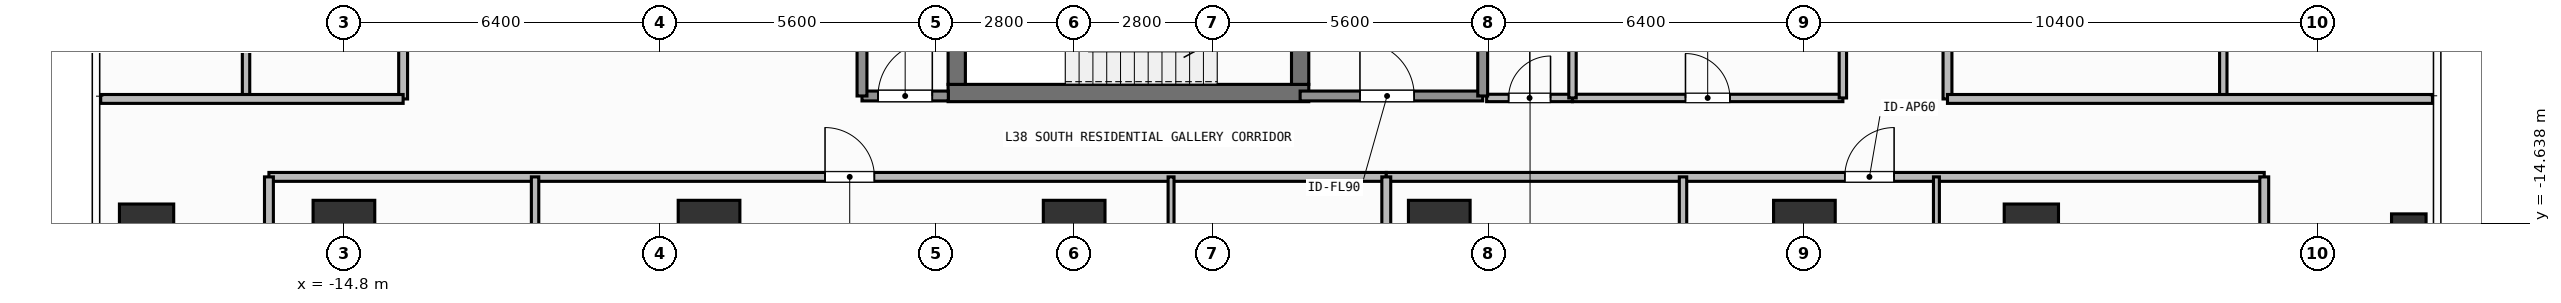
"""IFC4 building model, lengths in metres.
Left out: names, types, materials, properties, quantities, classifications, styles, units other than length and angle.
Written with IfcOpenShell. Run it as: python <this file> out.ifc"""

import sys

from ifc_helpers import new_model, si_unit, direction, frame, frame_2d, origin, origin_2d, place, context, subcontext, project, spatial, rectangle, hollow_rectangle, extrude, element, fill, save


model = new_model("IFC4")
c1 = context("Model", 3, precision=1e-05, world=origin(), true_north=direction((0.0, 1.0)))
c2 = subcontext(c1, "Body", "Model", "MODEL_VIEW")
j1 = project(units=[si_unit("LENGTHUNIT", "METRE"), si_unit("PLANEANGLEUNIT", "RADIAN")], contexts=[c1])
p1 = place(None, origin())
s1 = spatial("IfcSite", under=j1, at=p1, CompositionType="ELEMENT")
p2 = place(p1, origin())
s2 = spatial("IfcBuilding", under=s1, at=p2, CompositionType="ELEMENT")
p3 = place(p2, frame((0.0, 0.0, 152.4)))
s3 = spatial("IfcBuildingStorey", under=s2, at=p3, CompositionType="ELEMENT", Elevation=152.4)
p4 = place(p3, frame((-2.555, -12.0, 0.0), z_axis=(0.0, 0.0, 1.0), x_axis=(1.0, 0.0, 0.0)))
e1 = element("IfcWall", 1, at=p4, inside=s3, PredefinedType="SHEAR", context=c2, shape_type="SweptSolid", body=[
    extrude(rectangle(XDim=7.31, YDim=0.35, at=frame_2d((3.655, 0.0))), origin(), (0.0, 0.0, 1.0), 3.9),
])
p5 = place(p3, frame((-2.38, -11.825, 0.0), z_axis=(0.0, 0.0, 1.0), x_axis=(0.0, 1.0, 0.0)))
e2 = element("IfcWall", 2, at=p5, inside=s3, PredefinedType="SHEAR", context=c2, shape_type="SweptSolid", body=[
    extrude(rectangle(XDim=2.925, YDim=0.35, at=frame_2d((1.462, 0.0))), origin(), (0.0, 0.0, 1.0), 3.9),
])
p6 = place(p3, frame((4.58, -8.9, 0.0), z_axis=(0.0, 0.0, 1.0), x_axis=(0.0, -1.0, 0.0)))
e3 = element("IfcWall", 3, at=p6, inside=s3, PredefinedType="SHEAR", context=c2, shape_type="SweptSolid", body=[
    extrude(rectangle(XDim=2.925, YDim=0.35, at=frame_2d((1.462, 0.0))), origin(), (0.0, 0.0, 1.0), 3.9),
])
p7 = place(p6, frame((0.913, 0.0, 0.0)))
e4 = element("IfcOpeningElement", 4, at=p7, cuts=e3, PredefinedType="OPENING", context=c2, shape_type="SweptSolid", body=[
    extrude(rectangle(XDim=1.1, YDim=2.15, at=frame_2d((0.55, 1.075))), frame((0.0, 0.185, 0.0), z_axis=(0.0, -1.0, 0.0), x_axis=(1.0, 0.0, 0.0)), (0.0, 0.0, 1.0), 0.37),
])
for number, where, z_axis, x_axis in (
    (5, (-14.8, -14.8, 0.0), (0.0, 0.0, 1.0), (1.0, 0.0, 0.0)),
    (6, (-7.4, -14.8, 0.0), (0.0, 0.0, 1.0), (1.0, 0.0, 0.0)),
    (7, (0.0, -14.8, 0.0), (0.0, 0.0, 1.0), (1.0, 0.0, 0.0)),
    (8, (7.4, -14.8, 0.0), (0.0, 0.0, 1.0), (1.0, 0.0, 0.0)),
    (9, (14.8, -14.8, 0.0), (0.0, 0.0, 1.0), (1.0, 0.0, 0.0)),
):
    element("IfcColumn", number, at=place(p3, frame(where, z_axis=z_axis, x_axis=x_axis)), inside=s3, PredefinedType="COLUMN", context=c2, shape_type="SweptSolid", body=[
        extrude(rectangle(XDim=1.25, YDim=1.25, at=origin_2d()), origin(), (0.0, 0.0, 1.0), 3.9),
    ])
for number, where, z_axis, x_axis in (
    (10, (-18.8, -14.8, 0.0), (0.0, 0.0, 1.0), (1.0, 0.0, 0.0)),
    (11, (19.4, -14.8, 0.0), (0.0, 0.0, 1.0), (1.0, 0.0, 0.0)),
):
    element("IfcColumn", number, at=place(p3, frame(where, z_axis=z_axis, x_axis=x_axis)), inside=s3, PredefinedType="COLUMN", context=c2, shape_type="SweptSolid", body=[
        extrude(rectangle(XDim=1.1, YDim=1.1, at=origin_2d()), origin(), (0.0, 0.0, 1.0), 3.9),
    ])
p8 = place(p3, frame((27.05, -14.8, 0.0), z_axis=(0.0, 0.0, 1.0), x_axis=(1.0, 0.0, 0.0)))
e12 = element("IfcColumn", 12, at=p8, inside=s3, PredefinedType="COLUMN", context=c2, shape_type="SweptSolid", body=[
    extrude(hollow_rectangle(XDim=0.7, YDim=0.7, WallThickness=0.032, at=origin_2d()), origin(), (0.0, 0.0, 1.0), 3.9),
])
p9 = place(p3, frame((4.58, -12.06, 0.0), z_axis=(0.0, 0.0, 1.0), x_axis=(1.0, 0.0, 0.0)))
e13 = element("IfcWall", 13, at=p9, inside=s3, PredefinedType="SOLIDWALL", context=c2, shape_type="SweptSolid", body=[
    extrude(rectangle(XDim=3.7, YDim=0.2, at=frame_2d((1.85, 0.0))), origin(), (0.0, 0.0, 1.0), 3.6),
])
p10 = place(p9, frame((1.212, 0.0, 0.0)))
e14 = element("IfcOpeningElement", 14, at=p10, cuts=e13, PredefinedType="OPENING", context=c2, shape_type="SweptSolid", body=[
    extrude(rectangle(XDim=1.1, YDim=2.15, at=frame_2d((0.55, 1.075))), frame((0.0, 0.11, 0.0), z_axis=(0.0, -1.0, 0.0), x_axis=(1.0, 0.0, 0.0)), (0.0, 0.0, 1.0), 0.22),
])
p11 = place(p3, frame((-4.3, -12.06, 0.0), z_axis=(0.0, 0.0, 1.0), x_axis=(1.0, 0.0, 0.0)))
e15 = element("IfcWall", 15, at=p11, inside=s3, PredefinedType="SOLIDWALL", context=c2, shape_type="SweptSolid", body=[
    extrude(rectangle(XDim=1.75, YDim=0.2, at=frame_2d((0.875, 0.0))), origin(), (0.0, 0.0, 1.0), 3.6),
])
p12 = place(p11, frame((0.325, 0.0, 0.0)))
e16 = element("IfcOpeningElement", 16, at=p12, cuts=e15, PredefinedType="OPENING", context=c2, shape_type="SweptSolid", body=[
    extrude(rectangle(XDim=1.1, YDim=2.15, at=frame_2d((0.55, 1.075))), frame((0.0, 0.11, 0.0), z_axis=(0.0, -1.0, 0.0), x_axis=(1.0, 0.0, 0.0)), (0.0, 0.0, 1.0), 0.22),
])
p13 = place(p3, frame((8.36, -12.1, 0.0), z_axis=(0.0, 0.0, 1.0), x_axis=(1.0, 0.0, 0.0)))
e17 = element("IfcWall", 17, at=p13, inside=s3, PredefinedType="PARTITIONING", context=c2, shape_type="SweptSolid", body=[
    extrude(rectangle(XDim=1.74, YDim=0.15, at=frame_2d((0.87, 0.0))), origin(), (0.0, 0.0, 1.0), 3.6),
])
p14 = place(p13, frame((0.445, 0.0, 0.0)))
e18 = element("IfcOpeningElement", 18, at=p14, cuts=e17, PredefinedType="OPENING", context=c2, shape_type="SweptSolid", body=[
    extrude(rectangle(XDim=0.85, YDim=2.1, at=frame_2d((0.425, 1.05))), frame((0.0, 0.085, 0.0), z_axis=(0.0, -1.0, 0.0), x_axis=(1.0, 0.0, 0.0)), (0.0, 0.0, 1.0), 0.17),
])
p15 = place(p3, frame((10.1, -12.1, 0.0), z_axis=(0.0, 0.0, 1.0), x_axis=(1.0, 0.0, 0.0)))
e19 = element("IfcWall", 19, at=p15, inside=s3, PredefinedType="PARTITIONING", context=c2, shape_type="SweptSolid", body=[
    extrude(rectangle(XDim=5.48, YDim=0.15, at=frame_2d((2.74, 0.0))), origin(), (0.0, 0.0, 1.0), 3.6),
])
p16 = place(p15, frame((2.29, 0.0, 0.0)))
e20 = element("IfcOpeningElement", 20, at=p16, cuts=e19, PredefinedType="OPENING", context=c2, shape_type="SweptSolid", body=[
    extrude(rectangle(XDim=0.9, YDim=2.1, at=frame_2d((0.45, 1.05))), frame((0.0, 0.085, 0.0), z_axis=(0.0, -1.0, 0.0), x_axis=(1.0, 0.0, 0.0)), (0.0, 0.0, 1.0), 0.17),
])
p17 = place(p3, frame((-16.32, -13.7, 0.0), z_axis=(0.0, 0.0, 1.0), x_axis=(1.0, 0.0, 0.0)))
e21 = element("IfcWall", 21, at=p17, inside=s3, PredefinedType="PARTITIONING", context=c2, shape_type="SweptSolid", body=[
    extrude(rectangle(XDim=22.646, YDim=0.18, at=frame_2d((11.323, 0.0))), origin(), (0.0, 0.0, 1.0), 3.6),
])
p18 = place(p17, frame((11.271, 0.0, 0.0)))
e22 = element("IfcOpeningElement", 22, at=p18, cuts=e21, PredefinedType="OPENING", context=c2, shape_type="SweptSolid", body=[
    extrude(rectangle(XDim=1.0, YDim=2.2, at=frame_2d((0.5, 1.1))), frame((0.0, 0.1, 0.0), z_axis=(0.0, -1.0, 0.0), x_axis=(1.0, 0.0, 0.0)), (0.0, 0.0, 1.0), 0.2),
])
p19 = place(p3, frame((-10.926, -19.634, 0.0), z_axis=(0.0, 0.0, 1.0), x_axis=(0.0, 1.0, 0.0)))
e23 = element("IfcWall", 23, at=p19, inside=s3, PredefinedType="PARTITIONING", context=c2, shape_type="SweptSolid", body=[
    extrude(rectangle(XDim=5.934, YDim=0.15, at=frame_2d((2.967, 0.0))), origin(), (0.0, 0.0, 1.0), 3.29),
])
p20 = place(p19, frame((2.63, 0.0, 0.0)))
e24 = element("IfcOpeningElement", 24, at=p20, cuts=e23, PredefinedType="OPENING", context=c2, shape_type="SweptSolid", body=[
    extrude(rectangle(XDim=0.85, YDim=2.1, at=frame_2d((0.425, 1.05))), frame((0.0, 0.085, 0.0), z_axis=(0.0, -1.0, 0.0), x_axis=(1.0, 0.0, 0.0)), (0.0, 0.0, 1.0), 0.17),
])
p21 = place(p3, frame((1.964, -17.628, 0.0), z_axis=(0.0, 0.0, 1.0), x_axis=(0.0, 1.0, 0.0)))
e25 = element("IfcWall", 25, at=p21, inside=s3, PredefinedType="PARTITIONING", context=c2, shape_type="SweptSolid", body=[
    extrude(rectangle(XDim=3.928, YDim=0.12, at=frame_2d((1.964, 0.0))), origin(), (0.0, 0.0, 1.0), 3.6),
])
p22 = place(p21, frame((1.194, 0.0, 0.0)))
e26 = element("IfcOpeningElement", 26, at=p22, cuts=e25, PredefinedType="OPENING", context=c2, shape_type="SweptSolid", body=[
    extrude(rectangle(XDim=0.85, YDim=2.1, at=frame_2d((0.425, 1.05))), frame((0.0, 0.07, 0.0), z_axis=(0.0, -1.0, 0.0), x_axis=(1.0, 0.0, 0.0)), (0.0, 0.0, 1.0), 0.14),
])
p23 = place(p3, frame((6.326, -13.7, 0.0), z_axis=(0.0, 0.0, 1.0), x_axis=(1.0, 0.0, 0.0)))
e27 = element("IfcWall", 27, at=p23, inside=s3, PredefinedType="PARTITIONING", context=c2, shape_type="SweptSolid", body=[
    extrude(rectangle(XDim=17.794, YDim=0.18, at=frame_2d((8.897, 0.0))), origin(), (0.0, 0.0, 1.0), 3.6),
])
p24 = place(p23, frame((9.292, 0.0, 0.0)))
e28 = element("IfcOpeningElement", 28, at=p24, cuts=e27, PredefinedType="OPENING", context=c2, shape_type="SweptSolid", body=[
    extrude(rectangle(XDim=1.0, YDim=2.2, at=frame_2d((0.5, 1.1))), frame((0.0, 0.1, 0.0), z_axis=(0.0, -1.0, 0.0), x_axis=(1.0, 0.0, 0.0)), (0.0, 0.0, 1.0), 0.2),
])
p25 = place(p3, frame((12.34, -19.39, 0.0), z_axis=(0.0, 0.0, 1.0), x_axis=(0.0, 1.0, 0.0)))
e29 = element("IfcWall", 29, at=p25, inside=s3, PredefinedType="PARTITIONING", context=c2, shape_type="SweptSolid", body=[
    extrude(rectangle(XDim=5.69, YDim=0.15, at=frame_2d((2.845, 0.0))), origin(), (0.0, 0.0, 1.0), 3.6),
])
p26 = place(p25, frame((2.42, 0.0, 0.0)))
e30 = element("IfcOpeningElement", 30, at=p26, cuts=e29, PredefinedType="OPENING", context=c2, shape_type="SweptSolid", body=[
    extrude(rectangle(XDim=0.85, YDim=2.1, at=frame_2d((0.425, 1.05))), frame((0.0, 0.085, 0.0), z_axis=(0.0, -1.0, 0.0), x_axis=(1.0, 0.0, 0.0)), (0.0, 0.0, 1.0), 0.17),
])
p27 = place(p3, frame((17.476, -17.683, 0.0), z_axis=(0.0, 0.0, 1.0), x_axis=(0.0, 1.0, 0.0)))
e31 = element("IfcWall", 31, at=p27, inside=s3, PredefinedType="PARTITIONING", context=c2, shape_type="SweptSolid", body=[
    extrude(rectangle(XDim=3.983, YDim=0.12, at=frame_2d((1.992, 0.0))), origin(), (0.0, 0.0, 1.0), 3.6),
])
p28 = place(p27, frame((1.391, 0.0, 0.0)))
e32 = element("IfcOpeningElement", 32, at=p28, cuts=e31, PredefinedType="OPENING", context=c2, shape_type="SweptSolid", body=[
    extrude(rectangle(XDim=0.85, YDim=2.1, at=frame_2d((0.425, 1.05))), frame((0.0, 0.07, 0.0), z_axis=(0.0, -1.0, 0.0), x_axis=(1.0, 0.0, 0.0)), (0.0, 0.0, 1.0), 0.14),
])
p29 = place(p3, frame((-13.6, -12.12, 0.0), z_axis=(0.0, 0.0, 1.0), x_axis=(0.0, 1.0, 0.0)))
e33 = element("IfcWall", 33, at=p29, inside=s3, PredefinedType="PARTITIONING", context=c2, shape_type="SweptSolid", body=[
    extrude(rectangle(XDim=10.956, YDim=0.18, at=frame_2d((5.478, 0.0))), origin(), (0.0, 0.0, 1.0), 3.6),
])
p30 = place(p29, frame((5.513, 0.0, 0.0)))
e34 = element("IfcOpeningElement", 34, at=p30, cuts=e33, PredefinedType="OPENING", context=c2, shape_type="SweptSolid", body=[
    extrude(rectangle(XDim=1.0, YDim=2.2, at=frame_2d((0.5, 1.1))), frame((0.0, 0.1, 0.0), z_axis=(0.0, -1.0, 0.0), x_axis=(1.0, 0.0, 0.0)), (0.0, 0.0, 1.0), 0.2),
])
p31 = place(p3, frame((17.7, -12.12, 0.0), z_axis=(0.0, 0.0, 1.0), x_axis=(0.0, 1.0, 0.0)))
e35 = element("IfcWall", 35, at=p31, inside=s3, PredefinedType="PARTITIONING", context=c2, shape_type="SweptSolid", body=[
    extrude(rectangle(XDim=24.24, YDim=0.18, at=frame_2d((12.12, 0.0))), origin(), (0.0, 0.0, 1.0), 3.6),
])
p32 = place(p31, frame((11.62, 0.0, 0.0)))
e36 = element("IfcOpeningElement", 36, at=p32, cuts=e35, PredefinedType="OPENING", context=c2, shape_type="SweptSolid", body=[
    extrude(rectangle(XDim=1.0, YDim=2.2, at=frame_2d((0.5, 1.1))), frame((0.0, 0.1, 0.0), z_axis=(0.0, -1.0, 0.0), x_axis=(1.0, 0.0, 0.0)), (0.0, 0.0, 1.0), 0.2),
])
for number, where, z_axis, x_axis in (
    (37, (8.28, -12.06, 0.0), (0.0, 0.0, 1.0), (0.0, 1.0, 0.0)),
    (38, (-4.3, -12.06, 0.0), (0.0, 0.0, 1.0), (0.0, 1.0, 0.0)),
):
    element("IfcWall", number, at=place(p3, frame(where, z_axis=z_axis, x_axis=x_axis)), inside=s3, PredefinedType="SOLIDWALL", context=c2, shape_type="SweptSolid", body=[
        extrude(rectangle(XDim=3.185, YDim=0.2, at=frame_2d((1.593, 0.0))), origin(), (0.0, 0.0, 1.0), 3.6),
    ])
p33 = place(p3, frame((10.1, -12.1, 0.0), z_axis=(0.0, 0.0, 1.0), x_axis=(0.0, 1.0, 0.0)))
e39 = element("IfcWall", 39, at=p33, inside=s3, PredefinedType="PARTITIONING", context=c2, shape_type="SweptSolid", body=[
    extrude(rectangle(XDim=2.35, YDim=0.15, at=frame_2d((1.175, 0.0))), origin(), (0.0, 0.0, 1.0), 3.6),
])
p34 = place(p3, frame((15.58, -12.1, 0.0), z_axis=(0.0, 0.0, 1.0), x_axis=(0.0, 1.0, 0.0)))
e40 = element("IfcWall", 40, at=p34, inside=s3, PredefinedType="PARTITIONING", context=c2, shape_type="SweptSolid", body=[
    extrude(rectangle(XDim=6.25, YDim=0.15, at=frame_2d((3.125, 0.0))), origin(), (0.0, 0.0, 1.0), 3.6),
])
for number, where, z_axis, x_axis in (
    (41, (-16.32, -22.51, 0.0), (0.0, 0.0, 1.0), (0.0, 1.0, 0.0)),
    (42, (24.12, -22.51, 0.0), (0.0, 0.0, 1.0), (0.0, 1.0, 0.0)),
):
    element("IfcWall", number, at=place(p3, frame(where, z_axis=z_axis, x_axis=x_axis)), inside=s3, PredefinedType="PARTITIONING", context=c2, shape_type="SweptSolid", body=[
        extrude(rectangle(XDim=8.81, YDim=0.18, at=frame_2d((4.405, 0.0))), origin(), (0.0, 0.0, 1.0), 3.6),
    ])
p35 = place(p3, frame((6.326, -23.63, 0.0), z_axis=(0.0, 0.0, 1.0), x_axis=(0.0, 1.0, 0.0)))
e43 = element("IfcWall", 43, at=p35, inside=s3, PredefinedType="PARTITIONING", context=c2, shape_type="SweptSolid", body=[
    extrude(rectangle(XDim=9.93, YDim=0.18, at=frame_2d((4.965, 0.0))), origin(), (0.0, 0.0, 1.0), 3.6),
])
p36 = place(p3, frame((-16.784, -12.12, 0.0), z_axis=(0.0, 0.0, 1.0), x_axis=(0.0, 1.0, 0.0)))
e44 = element("IfcWall", 44, at=p36, inside=s3, PredefinedType="PARTITIONING", context=c2, shape_type="SweptSolid", body=[
    extrude(rectangle(XDim=3.726, YDim=0.15, at=frame_2d((1.863, 0.0))), origin(), (0.0, 0.0, 1.0), 3.6),
])
p37 = place(p3, frame((-19.73, -12.12, 0.0), z_axis=(0.0, 0.0, 1.0), x_axis=(1.0, 0.0, 0.0)))
e45 = element("IfcWall", 45, at=p37, inside=s3, PredefinedType="PARTITIONING", context=c2, shape_type="SweptSolid", body=[
    extrude(rectangle(XDim=6.13, YDim=0.18, at=frame_2d((3.065, 0.0))), origin(), (0.0, 0.0, 1.0), 3.6),
])
p38 = place(p3, frame((23.29, -12.12, 0.0), z_axis=(0.0, 0.0, 1.0), x_axis=(0.0, 1.0, 0.0)))
e46 = element("IfcWall", 46, at=p38, inside=s3, PredefinedType="PARTITIONING", context=c2, shape_type="SweptSolid", body=[
    extrude(rectangle(XDim=6.684, YDim=0.15, at=frame_2d((3.342, 0.0))), origin(), (0.0, 0.0, 1.0), 3.6),
])
p39 = place(p3, frame((17.7, -12.12, 0.0), z_axis=(0.0, 0.0, 1.0), x_axis=(1.0, 0.0, 0.0)))
e47 = element("IfcWall", 47, at=p39, inside=s3, PredefinedType="PARTITIONING", context=c2, shape_type="SweptSolid", body=[
    extrude(rectangle(XDim=9.83, YDim=0.18, at=frame_2d((4.915, 0.0))), origin(), (0.0, 0.0, 1.0), 3.6),
])
p40 = place(p10, origin())
e48 = element("IfcDoor", 48, at=p40, inside=s3, OperationType="SINGLE_SWING_LEFT", PredefinedType="DOOR", context=c2, shape_type="SweptSolid", body=[
    extrude(rectangle(XDim=1.1, YDim=2.15, at=frame_2d((0.55, 1.075))), frame((0.0, 0.025, 0.0), z_axis=(0.0, -1.0, 0.0), x_axis=(1.0, 0.0, 0.0)), (0.0, 0.0, 1.0), 0.05),
])
fill(e14, e48)
p41 = place(p12, origin())
e49 = element("IfcDoor", 49, at=p41, inside=s3, OperationType="SINGLE_SWING_RIGHT", PredefinedType="DOOR", context=c2, shape_type="SweptSolid", body=[
    extrude(rectangle(XDim=1.1, YDim=2.15, at=frame_2d((0.55, 1.075))), frame((0.0, 0.025, 0.0), z_axis=(0.0, -1.0, 0.0), x_axis=(1.0, 0.0, 0.0)), (0.0, 0.0, 1.0), 0.05),
])
fill(e16, e49)
p42 = place(p14, origin())
e50 = element("IfcDoor", 50, at=p42, inside=s3, OperationType="SINGLE_SWING_RIGHT", PredefinedType="DOOR", context=c2, shape_type="SweptSolid", body=[
    extrude(rectangle(XDim=0.85, YDim=2.1, at=frame_2d((0.425, 1.05))), frame((0.0, 0.025, 0.0), z_axis=(0.0, -1.0, 0.0), x_axis=(1.0, 0.0, 0.0)), (0.0, 0.0, 1.0), 0.05),
])
fill(e18, e50)
p43 = place(p16, origin())
e51 = element("IfcDoor", 51, at=p43, inside=s3, OperationType="SINGLE_SWING_LEFT", PredefinedType="DOOR", context=c2, shape_type="SweptSolid", body=[
    extrude(rectangle(XDim=0.9, YDim=2.1, at=frame_2d((0.45, 1.05))), frame((0.0, 0.025, 0.0), z_axis=(0.0, -1.0, 0.0), x_axis=(1.0, 0.0, 0.0)), (0.0, 0.0, 1.0), 0.05),
])
fill(e20, e51)
p44 = place(p18, origin())
e52 = element("IfcDoor", 52, at=p44, inside=s3, OperationType="SINGLE_SWING_LEFT", PredefinedType="DOOR", context=c2, shape_type="SweptSolid", body=[
    extrude(rectangle(XDim=1.0, YDim=2.2, at=frame_2d((0.5, 1.1))), frame((0.0, 0.025, 0.0), z_axis=(0.0, -1.0, 0.0), x_axis=(1.0, 0.0, 0.0)), (0.0, 0.0, 1.0), 0.05),
])
fill(e22, e52)
p45 = place(p24, origin())
e53 = element("IfcDoor", 53, at=p45, inside=s3, OperationType="SINGLE_SWING_RIGHT", PredefinedType="DOOR", context=c2, shape_type="SweptSolid", body=[
    extrude(rectangle(XDim=1.0, YDim=2.2, at=frame_2d((0.5, 1.1))), frame((0.0, 0.025, 0.0), z_axis=(0.0, -1.0, 0.0), x_axis=(1.0, 0.0, 0.0)), (0.0, 0.0, 1.0), 0.05),
])
fill(e28, e53)
save(model, sys.argv[1])
